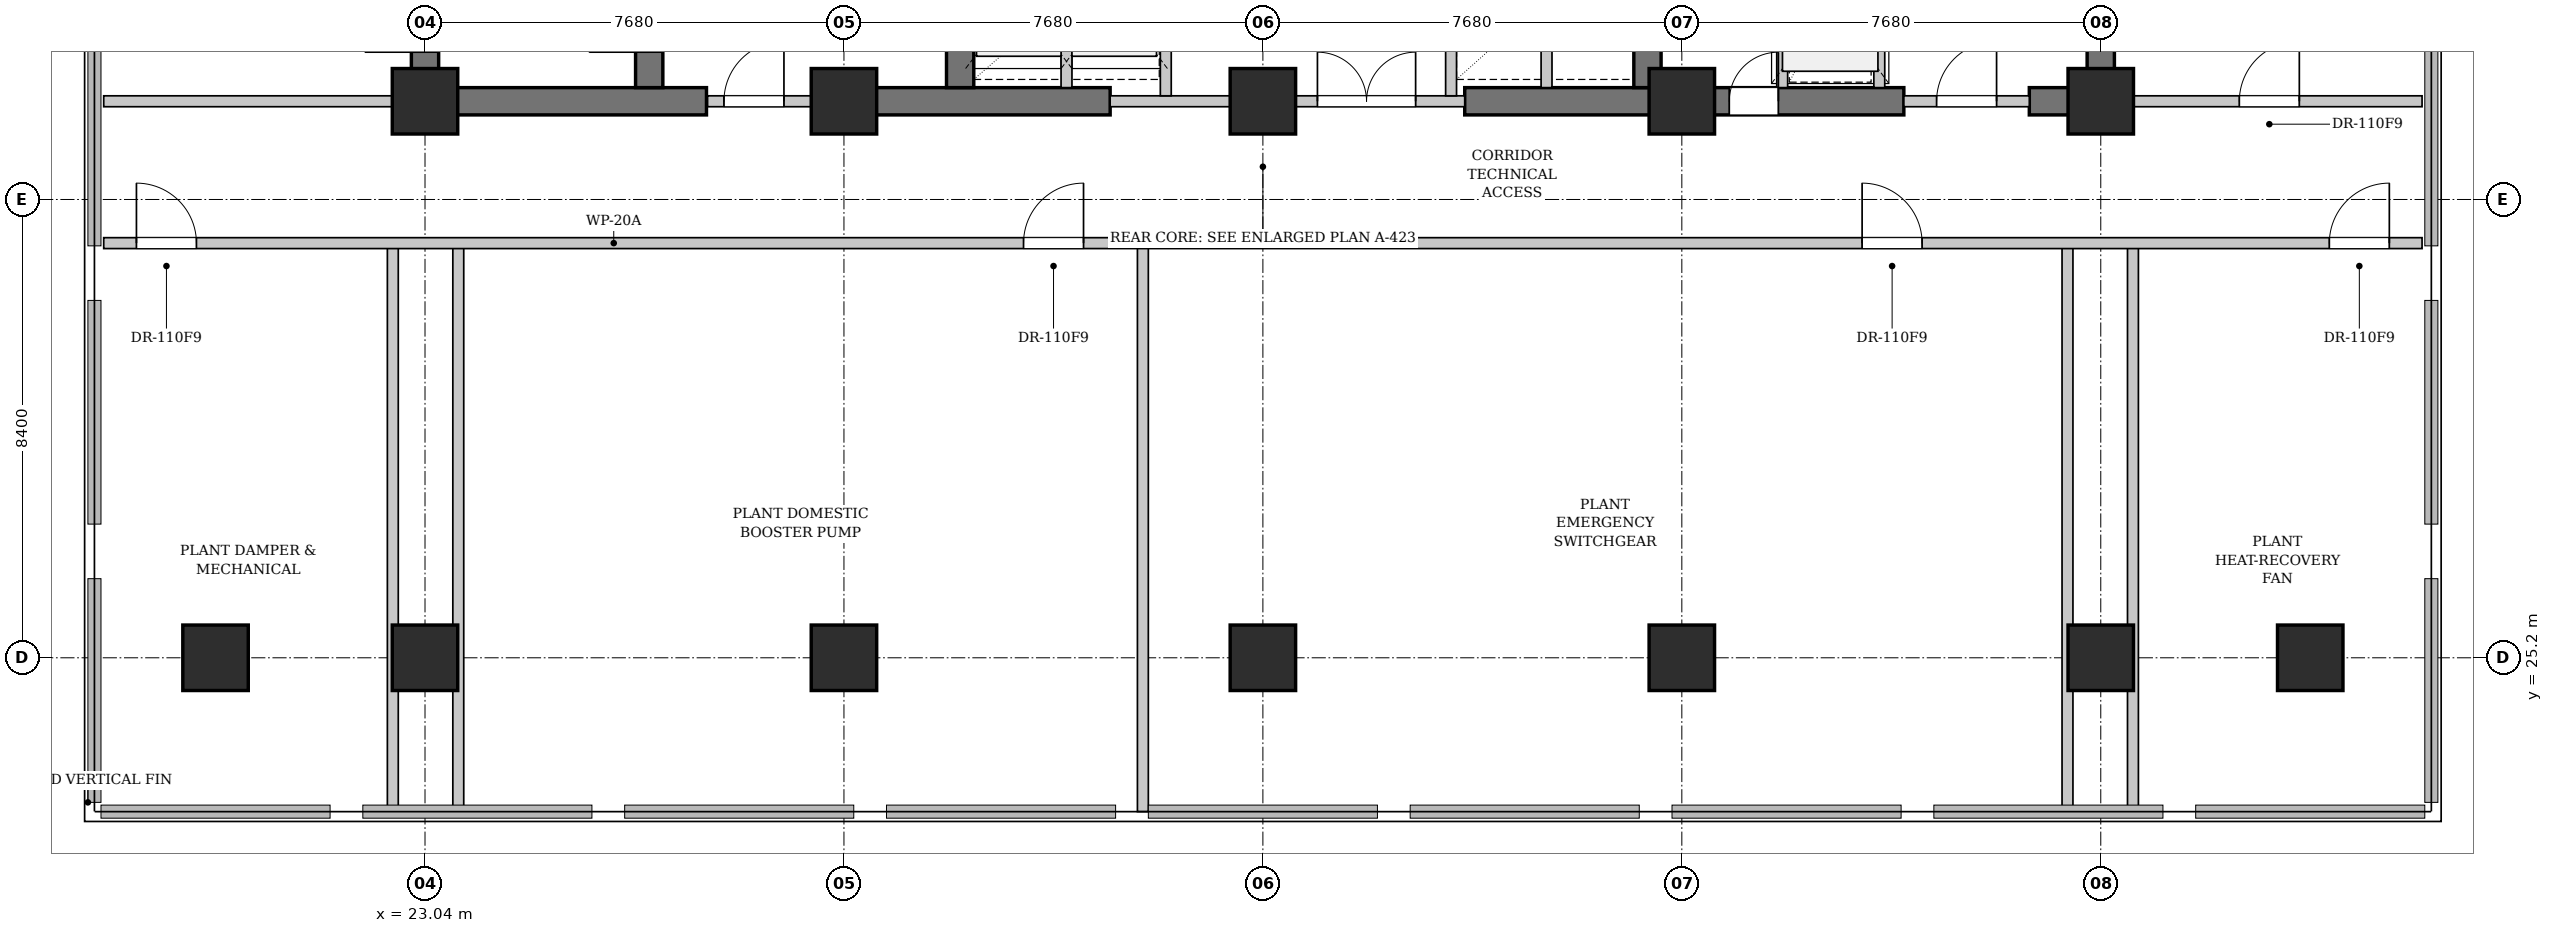
"""IFC4 building model, lengths in metres.
Left out: names, types, materials, properties, quantities, classifications, styles, units other than length and angle.
Written with IfcOpenShell. Run it as: python <this file> out.ifc"""

import sys

from ifc_helpers import new_model, si_unit, direction, frame, frame_2d, origin, origin_2d, place, context, subcontext, project, spatial, rectangle, extrude, element, fill, save


model = new_model("IFC4")
c1 = context("Model", 3, precision=1e-05, world=origin(), true_north=direction((0.0, 1.0)))
c2 = subcontext(c1, "Body", "Model", "MODEL_VIEW")
j1 = project(units=[si_unit("LENGTHUNIT", "METRE"), si_unit("PLANEANGLEUNIT", "RADIAN")], contexts=[c1])
p1 = place(None, origin())
s1 = spatial("IfcSite", under=j1, at=p1, CompositionType="ELEMENT")
p2 = place(p1, origin())
s2 = spatial("IfcBuilding", under=s1, at=p2, CompositionType="ELEMENT")
p3 = place(p2, frame((0.0, 0.0, 85.8)))
s3 = spatial("IfcBuildingStorey", under=s2, at=p3, CompositionType="ELEMENT", Elevation=85.8)
p4 = place(p3, frame((22.79, 35.4, 0.0), z_axis=(0.0, 0.0, 1.0), x_axis=(1.0, 0.0, 0.0)))
e1 = element("IfcWall", 1, at=p4, inside=s3, PredefinedType="SHEAR", context=c2, shape_type="SweptSolid", body=[
    extrude(rectangle(XDim=5.41, YDim=0.5, at=frame_2d((2.705, 0.0))), origin(), (0.0, 0.0, 1.0), 3.48),
])
p5 = place(p3, frame((30.72, 35.4, 0.0), z_axis=(0.0, 0.0, 1.0), x_axis=(1.0, 0.0, 0.0)))
e2 = element("IfcWall", 2, at=p5, inside=s3, PredefinedType="SHEAR", context=c2, shape_type="SweptSolid", body=[
    extrude(rectangle(XDim=4.88, YDim=0.5, at=frame_2d((2.44, 0.0))), origin(), (0.0, 0.0, 1.0), 3.48),
])
p6 = place(p3, frame((42.1, 35.4, 0.0), z_axis=(0.0, 0.0, 1.0), x_axis=(1.0, 0.0, 0.0)))
e3 = element("IfcWall", 3, at=p6, inside=s3, PredefinedType="SHEAR", context=c2, shape_type="SweptSolid", body=[
    extrude(rectangle(XDim=8.05, YDim=0.5, at=frame_2d((4.025, 0.0))), origin(), (0.0, 0.0, 1.0), 3.48),
])
p7 = place(p6, frame((4.85, 0.0, 0.0)))
e4 = element("IfcOpeningElement", 4, at=p7, cuts=e3, PredefinedType="OPENING", context=c2, shape_type="SweptSolid", body=[
    extrude(rectangle(XDim=0.9, YDim=2.15, at=frame_2d((0.45, 1.075))), frame((0.0, 0.26, 0.0), z_axis=(0.0, -1.0, 0.0), x_axis=(1.0, 0.0, 0.0)), (0.0, 0.0, 1.0), 0.52),
])
p8 = place(p3, frame((52.45, 35.4, 0.0), z_axis=(0.0, 0.0, 1.0), x_axis=(1.0, 0.0, 0.0)))
e5 = element("IfcWall", 5, at=p8, inside=s3, PredefinedType="SHEAR", context=c2, shape_type="SweptSolid", body=[
    extrude(rectangle(XDim=1.56, YDim=0.5, at=frame_2d((0.78, 0.0))), origin(), (0.0, 0.0, 1.0), 3.48),
])
p9 = place(p3, frame((23.04, 35.65, 0.0), z_axis=(0.0, 0.0, 1.0), x_axis=(0.0, 1.0, 0.0)))
e6 = element("IfcWall", 6, at=p9, inside=s3, PredefinedType="SHEAR", context=c2, shape_type="SweptSolid", body=[
    extrude(rectangle(XDim=10.3, YDim=0.5, at=frame_2d((5.15, 0.0))), origin(), (0.0, 0.0, 1.0), 3.48),
])
p10 = place(p9, frame((0.65, 0.0, 0.0)))
e7 = element("IfcOpeningElement", 7, at=p10, cuts=e6, PredefinedType="OPENING", context=c2, shape_type="SweptSolid", body=[
    extrude(rectangle(XDim=1.1, YDim=2.15, at=frame_2d((0.55, 1.075))), frame((0.0, 0.26, 0.0), z_axis=(0.0, -1.0, 0.0), x_axis=(1.0, 0.0, 0.0)), (0.0, 0.0, 1.0), 0.52),
])
p11 = place(p3, frame((27.15, 35.65, 0.0), z_axis=(0.0, 0.0, 1.0), x_axis=(0.0, 1.0, 0.0)))
e8 = element("IfcWall", 8, at=p11, inside=s3, PredefinedType="SHEAR", context=c2, shape_type="SweptSolid", body=[
    extrude(rectangle(XDim=10.3, YDim=0.5, at=frame_2d((5.15, 0.0))), origin(), (0.0, 0.0, 1.0), 3.48),
])
p12 = place(p11, frame((0.65, 0.0, 0.0)))
e9 = element("IfcOpeningElement", 9, at=p12, cuts=e8, PredefinedType="OPENING", context=c2, shape_type="SweptSolid", body=[
    extrude(rectangle(XDim=1.1, YDim=2.15, at=frame_2d((0.55, 1.075))), frame((0.0, 0.26, 0.0), z_axis=(0.0, -1.0, 0.0), x_axis=(1.0, 0.0, 0.0)), (0.0, 0.0, 1.0), 0.52),
])
for number, where, z_axis, x_axis in (
    (10, (32.85, 35.65, 0.0), (0.0, 0.0, 1.0), (0.0, 1.0, 0.0)),
    (11, (45.45, 35.65, 0.0), (0.0, 0.0, 1.0), (0.0, 1.0, 0.0)),
    (12, (53.76, 35.65, 0.0), (0.0, 0.0, 1.0), (0.0, 1.0, 0.0)),
):
    element("IfcWall", number, at=place(p3, frame(where, z_axis=z_axis, x_axis=x_axis)), inside=s3, PredefinedType="SHEAR", context=c2, shape_type="SweptSolid", body=[
        extrude(rectangle(XDim=10.3, YDim=0.5, at=frame_2d((5.15, 0.0))), origin(), (0.0, 0.0, 1.0), 3.48),
    ])
for number, where, z_axis, x_axis in (
    (13, (23.04, 35.4, 0.0), (0.0, 0.0, 1.0), (1.0, 0.0, 0.0)),
    (14, (23.04, 25.2, 0.0), (0.0, 0.0, 1.0), (1.0, 0.0, 0.0)),
    (15, (30.72, 35.4, 0.0), (0.0, 0.0, 1.0), (1.0, 0.0, 0.0)),
    (16, (30.72, 25.2, 0.0), (0.0, 0.0, 1.0), (1.0, 0.0, 0.0)),
    (17, (38.4, 35.4, 0.0), (0.0, 0.0, 1.0), (1.0, 0.0, 0.0)),
    (18, (38.4, 25.2, 0.0), (0.0, 0.0, 1.0), (1.0, 0.0, 0.0)),
    (19, (46.08, 35.4, 0.0), (0.0, 0.0, 1.0), (1.0, 0.0, 0.0)),
    (20, (46.08, 25.2, 0.0), (0.0, 0.0, 1.0), (1.0, 0.0, 0.0)),
    (21, (53.76, 35.4, 0.0), (0.0, 0.0, 1.0), (1.0, 0.0, 0.0)),
    (22, (53.76, 25.2, 0.0), (0.0, 0.0, 1.0), (1.0, 0.0, 0.0)),
    (23, (19.2, 25.2, 0.0), (0.0, 0.0, 1.0), (1.0, 0.0, 0.0)),
    (24, (57.6, 25.2, 0.0), (0.0, 0.0, 1.0), (1.0, 0.0, 0.0)),
):
    element("IfcColumn", number, at=place(p3, frame(where, z_axis=z_axis, x_axis=x_axis)), inside=s3, PredefinedType="COLUMN", context=c2, shape_type="SweptSolid", body=[
        extrude(rectangle(XDim=1.2, YDim=1.2, at=origin_2d()), origin(), (0.0, 0.0, 1.0), 3.9),
    ])
p13 = place(p3, frame((28.22, 35.4, 0.0), z_axis=(0.0, 0.0, 1.0), x_axis=(1.0, 0.0, 0.0)))
e25 = element("IfcWall", 25, at=p13, inside=s3, PredefinedType="PARTITIONING", context=c2, shape_type="SweptSolid", body=[
    extrude(rectangle(XDim=2.5, YDim=0.2, at=frame_2d((1.25, 0.0))), origin(), (0.0, 0.0, 1.0), 2.565),
])
p14 = place(p13, frame((0.3, 0.0, 0.0)))
e26 = element("IfcOpeningElement", 26, at=p14, cuts=e25, PredefinedType="OPENING", context=c2, shape_type="SweptSolid", body=[
    extrude(rectangle(XDim=1.1, YDim=2.15, at=frame_2d((0.55, 1.075))), frame((0.0, 0.11, 0.0), z_axis=(0.0, -1.0, 0.0), x_axis=(1.0, 0.0, 0.0)), (0.0, 0.0, 1.0), 0.22),
])
p15 = place(p3, frame((35.6, 35.4, 0.0), z_axis=(0.0, 0.0, 1.0), x_axis=(1.0, 0.0, 0.0)))
e27 = element("IfcWall", 27, at=p15, inside=s3, PredefinedType="PARTITIONING", context=c2, shape_type="SweptSolid", body=[
    extrude(rectangle(XDim=6.5, YDim=0.2, at=frame_2d((3.25, 0.0))), origin(), (0.0, 0.0, 1.0), 2.275),
])
p16 = place(p15, frame((3.8, 0.0, 0.0)))
e28 = element("IfcOpeningElement", 28, at=p16, cuts=e27, PredefinedType="OPENING", context=c2, shape_type="SweptSolid", body=[
    extrude(rectangle(XDim=1.8, YDim=2.3, at=frame_2d((0.9, 1.15))), frame((0.0, 0.11, 0.0), z_axis=(0.0, -1.0, 0.0), x_axis=(1.0, 0.0, 0.0)), (0.0, 0.0, 1.0), 0.22),
])
p17 = place(p3, frame((34.8, 35.65, 0.0), z_axis=(0.0, 0.0, 1.0), x_axis=(0.0, 1.0, 0.0)))
e29 = element("IfcWall", 29, at=p17, inside=s3, PredefinedType="PARTITIONING", context=c2, shape_type="SweptSolid", body=[
    extrude(rectangle(XDim=3.25, YDim=0.2, at=frame_2d((1.625, 0.0))), origin(), (0.0, 0.0, 1.0), 3.48),
])
p18 = place(p3, frame((36.62, 35.5, 0.0), z_axis=(0.0, 0.0, 1.0), x_axis=(0.0, 1.0, 0.0)))
e30 = element("IfcWall", 30, at=p18, inside=s3, PredefinedType="PARTITIONING", context=c2, shape_type="SweptSolid", body=[
    extrude(rectangle(XDim=3.4, YDim=0.2, at=frame_2d((1.7, 0.0))), origin(), (0.0, 0.0, 1.0), 3.48),
])
p19 = place(p3, frame((43.6, 35.65, 0.0), z_axis=(0.0, 0.0, 1.0), x_axis=(0.0, 1.0, 0.0)))
e31 = element("IfcWall", 31, at=p19, inside=s3, PredefinedType="PARTITIONING", context=c2, shape_type="SweptSolid", body=[
    extrude(rectangle(XDim=3.25, YDim=0.2, at=frame_2d((1.625, 0.0))), origin(), (0.0, 0.0, 1.0), 3.48),
])
p20 = place(p3, frame((41.85, 35.5, 0.0), z_axis=(0.0, 0.0, 1.0), x_axis=(0.0, 1.0, 0.0)))
e32 = element("IfcWall", 32, at=p20, inside=s3, PredefinedType="PARTITIONING", context=c2, shape_type="SweptSolid", body=[
    extrude(rectangle(XDim=3.4, YDim=0.2, at=frame_2d((1.7, 0.0))), origin(), (0.0, 0.0, 1.0), 3.48),
])
p21 = place(p3, frame((50.15, 35.4, 0.0), z_axis=(0.0, 0.0, 1.0), x_axis=(1.0, 0.0, 0.0)))
e33 = element("IfcWall", 33, at=p21, inside=s3, PredefinedType="PARTITIONING", context=c2, shape_type="SweptSolid", body=[
    extrude(rectangle(XDim=2.3, YDim=0.2, at=frame_2d((1.15, 0.0))), origin(), (0.0, 0.0, 1.0), 2.565),
])
p22 = place(p21, frame((0.6, 0.0, 0.0)))
e34 = element("IfcOpeningElement", 34, at=p22, cuts=e33, PredefinedType="OPENING", context=c2, shape_type="SweptSolid", body=[
    extrude(rectangle(XDim=1.1, YDim=2.15, at=frame_2d((0.55, 1.075))), frame((0.0, 0.11, 0.0), z_axis=(0.0, -1.0, 0.0), x_axis=(1.0, 0.0, 0.0)), (0.0, 0.0, 1.0), 0.22),
])
p23 = place(p3, frame((49.7, 35.65, 0.0), z_axis=(0.0, 0.0, 1.0), x_axis=(0.0, 1.0, 0.0)))
e35 = element("IfcWall", 35, at=p23, inside=s3, PredefinedType="PARTITIONING", context=c2, shape_type="SweptSolid", body=[
    extrude(rectangle(XDim=3.15, YDim=0.2, at=frame_2d((1.575, 0.0))), origin(), (0.0, 0.0, 1.0), 3.48),
])
p24 = place(p23, frame((0.85, 0.0, 0.0)))
e36 = element("IfcOpeningElement", 36, at=p24, cuts=e35, PredefinedType="OPENING", context=c2, shape_type="SweptSolid", body=[
    extrude(rectangle(XDim=1.2, YDim=2.2, at=frame_2d((0.6, 1.1))), frame((0.0, 0.11, 0.0), z_axis=(0.0, -1.0, 0.0), x_axis=(1.0, 0.0, 0.0)), (0.0, 0.0, 1.0), 0.22),
])
p25 = place(p3, frame((47.92, 35.65, 0.0), z_axis=(0.0, 0.0, 1.0), x_axis=(0.0, 1.0, 0.0)))
e37 = element("IfcWall", 37, at=p25, inside=s3, PredefinedType="PARTITIONING", context=c2, shape_type="SweptSolid", body=[
    extrude(rectangle(XDim=3.15, YDim=0.2, at=frame_2d((1.575, 0.0))), origin(), (0.0, 0.0, 1.0), 3.48),
])
p26 = place(p3, frame((17.15, 35.4, 0.0), z_axis=(0.0, 0.0, 1.0), x_axis=(1.0, 0.0, 0.0)))
e38 = element("IfcWall", 38, at=p26, inside=s3, PredefinedType="PARTITIONING", context=c2, shape_type="SweptSolid", body=[
    extrude(rectangle(XDim=5.6, YDim=0.2, at=frame_2d((2.8, 0.0))), origin(), (0.0, 0.0, 1.0), 3.48),
])
p27 = place(p3, frame((54.05, 35.4, 0.0), z_axis=(0.0, 0.0, 1.0), x_axis=(1.0, 0.0, 0.0)))
e39 = element("IfcWall", 39, at=p27, inside=s3, PredefinedType="PARTITIONING", context=c2, shape_type="SweptSolid", body=[
    extrude(rectangle(XDim=5.6, YDim=0.2, at=frame_2d((2.8, 0.0))), origin(), (0.0, 0.0, 1.0), 3.48),
])
p28 = place(p27, frame((2.25, 0.0, 0.0)))
e40 = element("IfcOpeningElement", 40, at=p28, cuts=e39, PredefinedType="OPENING", context=c2, shape_type="SweptSolid", body=[
    extrude(rectangle(XDim=1.1, YDim=2.15, at=frame_2d((0.55, 1.075))), frame((0.0, 0.11, 0.0), z_axis=(0.0, -1.0, 0.0), x_axis=(1.0, 0.0, 0.0)), (0.0, 0.0, 1.0), 0.22),
])
p29 = place(p3, frame((22.45, 22.38, 0.0), z_axis=(0.0, 0.0, 1.0), x_axis=(0.0, 1.0, 0.0)))
e41 = element("IfcWall", 41, at=p29, inside=s3, PredefinedType="PARTITIONING", context=c2, shape_type="SweptSolid", body=[
    extrude(rectangle(XDim=10.42, YDim=0.2, at=frame_2d((5.21, 0.0))), origin(), (0.0, 0.0, 1.0), 2.275),
])
for number, where, z_axis, x_axis in (
    (42, (23.65, 22.38, 0.0), (0.0, 0.0, 1.0), (0.0, 1.0, 0.0)),
    (43, (36.2, 22.38, 0.0), (0.0, 0.0, 1.0), (0.0, 1.0, 0.0)),
    (44, (53.15, 22.38, 0.0), (0.0, 0.0, 1.0), (0.0, 1.0, 0.0)),
):
    element("IfcWall", number, at=place(p3, frame(where, z_axis=z_axis, x_axis=x_axis)), inside=s3, PredefinedType="PARTITIONING", context=c2, shape_type="SweptSolid", body=[
        extrude(rectangle(XDim=10.42, YDim=0.2, at=frame_2d((5.21, 0.0))), origin(), (0.0, 0.0, 1.0), 3.48),
    ])
p30 = place(p3, frame((54.35, 22.38, 0.0), z_axis=(0.0, 0.0, 1.0), x_axis=(0.0, 1.0, 0.0)))
e45 = element("IfcWall", 45, at=p30, inside=s3, PredefinedType="PARTITIONING", context=c2, shape_type="SweptSolid", body=[
    extrude(rectangle(XDim=10.42, YDim=0.2, at=frame_2d((5.21, 0.0))), origin(), (0.0, 0.0, 1.0), 2.275),
])
p31 = place(p3, frame((17.15, 32.8, 0.0), z_axis=(0.0, 0.0, 1.0), x_axis=(1.0, 0.0, 0.0)))
e46 = element("IfcWall", 46, at=p31, inside=s3, PredefinedType="PARTITIONING", context=c2, shape_type="SweptSolid", body=[
    extrude(rectangle(XDim=42.5, YDim=0.2, at=frame_2d((21.25, 0.0))), origin(), (0.0, 0.0, 1.0), 2.275),
])
p32 = place(p31, frame((0.6, 0.0, 0.0)))
e47 = element("IfcOpeningElement", 47, at=p32, cuts=e46, PredefinedType="OPENING", context=c2, shape_type="SweptSolid", body=[
    extrude(rectangle(XDim=1.1, YDim=2.15, at=frame_2d((0.55, 1.075))), frame((0.0, 0.11, 0.0), z_axis=(0.0, -1.0, 0.0), x_axis=(1.0, 0.0, 0.0)), (0.0, 0.0, 1.0), 0.22),
])
p33 = place(p31, frame((16.862, 0.0, 0.0)))
e48 = element("IfcOpeningElement", 48, at=p33, cuts=e46, PredefinedType="OPENING", context=c2, shape_type="SweptSolid", body=[
    extrude(rectangle(XDim=1.1, YDim=2.15, at=frame_2d((0.55, 1.075))), frame((0.0, 0.11, 0.0), z_axis=(0.0, -1.0, 0.0), x_axis=(1.0, 0.0, 0.0)), (0.0, 0.0, 1.0), 0.22),
])
p34 = place(p31, frame((32.235, 0.0, 0.0)))
e49 = element("IfcOpeningElement", 49, at=p34, cuts=e46, PredefinedType="OPENING", context=c2, shape_type="SweptSolid", body=[
    extrude(rectangle(XDim=1.1, YDim=2.15, at=frame_2d((0.55, 1.075))), frame((0.0, 0.11, 0.0), z_axis=(0.0, -1.0, 0.0), x_axis=(1.0, 0.0, 0.0)), (0.0, 0.0, 1.0), 0.22),
])
p35 = place(p31, frame((40.8, 0.0, 0.0)))
e50 = element("IfcOpeningElement", 50, at=p35, cuts=e46, PredefinedType="OPENING", context=c2, shape_type="SweptSolid", body=[
    extrude(rectangle(XDim=1.1, YDim=2.15, at=frame_2d((0.55, 1.075))), frame((0.0, 0.11, 0.0), z_axis=(0.0, -1.0, 0.0), x_axis=(1.0, 0.0, 0.0)), (0.0, 0.0, 1.0), 0.22),
])
p36 = place(p14, origin())
e51 = element("IfcDoor", 51, at=p36, inside=s3, OperationType="SINGLE_SWING_RIGHT", PredefinedType="DOOR", context=c2, shape_type="SweptSolid", body=[
    extrude(rectangle(XDim=1.1, YDim=2.15, at=frame_2d((0.55, 1.075))), frame((0.0, 0.025, 0.0), z_axis=(0.0, -1.0, 0.0), x_axis=(1.0, 0.0, 0.0)), (0.0, 0.0, 1.0), 0.05),
])
fill(e26, e51)
p37 = place(p16, origin())
e52 = element("IfcDoor", 52, at=p37, inside=s3, OperationType="DOUBLE_DOOR_SINGLE_SWING", PredefinedType="DOOR", context=c2, shape_type="SweptSolid", body=[
    extrude(rectangle(XDim=1.8, YDim=2.3, at=frame_2d((0.9, 1.15))), frame((0.0, 0.025, 0.0), z_axis=(0.0, -1.0, 0.0), x_axis=(1.0, 0.0, 0.0)), (0.0, 0.0, 1.0), 0.05),
])
fill(e28, e52)
p38 = place(p22, origin())
e53 = element("IfcDoor", 53, at=p38, inside=s3, OperationType="SINGLE_SWING_RIGHT", PredefinedType="DOOR", context=c2, shape_type="SweptSolid", body=[
    extrude(rectangle(XDim=1.1, YDim=2.15, at=frame_2d((0.55, 1.075))), frame((0.0, 0.025, 0.0), z_axis=(0.0, -1.0, 0.0), x_axis=(1.0, 0.0, 0.0)), (0.0, 0.0, 1.0), 0.05),
])
fill(e34, e53)
p39 = place(p28, origin())
e54 = element("IfcDoor", 54, at=p39, inside=s3, OperationType="SINGLE_SWING_RIGHT", PredefinedType="DOOR", context=c2, shape_type="SweptSolid", body=[
    extrude(rectangle(XDim=1.1, YDim=2.15, at=frame_2d((0.55, 1.075))), frame((0.0, 0.025, 0.0), z_axis=(0.0, -1.0, 0.0), x_axis=(1.0, 0.0, 0.0)), (0.0, 0.0, 1.0), 0.05),
])
fill(e40, e54)
p40 = place(p32, origin())
e55 = element("IfcDoor", 55, at=p40, inside=s3, OperationType="SINGLE_SWING_LEFT", PredefinedType="DOOR", context=c2, shape_type="SweptSolid", body=[
    extrude(rectangle(XDim=1.1, YDim=2.15, at=frame_2d((0.55, 1.075))), frame((0.0, 0.025, 0.0), z_axis=(0.0, -1.0, 0.0), x_axis=(1.0, 0.0, 0.0)), (0.0, 0.0, 1.0), 0.05),
])
fill(e47, e55)
p41 = place(p33, origin())
e56 = element("IfcDoor", 56, at=p41, inside=s3, OperationType="SINGLE_SWING_RIGHT", PredefinedType="DOOR", context=c2, shape_type="SweptSolid", body=[
    extrude(rectangle(XDim=1.1, YDim=2.15, at=frame_2d((0.55, 1.075))), frame((0.0, 0.025, 0.0), z_axis=(0.0, -1.0, 0.0), x_axis=(1.0, 0.0, 0.0)), (0.0, 0.0, 1.0), 0.05),
])
fill(e48, e56)
p42 = place(p34, origin())
e57 = element("IfcDoor", 57, at=p42, inside=s3, OperationType="SINGLE_SWING_LEFT", PredefinedType="DOOR", context=c2, shape_type="SweptSolid", body=[
    extrude(rectangle(XDim=1.1, YDim=2.15, at=frame_2d((0.55, 1.075))), frame((0.0, 0.025, 0.0), z_axis=(0.0, -1.0, 0.0), x_axis=(1.0, 0.0, 0.0)), (0.0, 0.0, 1.0), 0.05),
])
fill(e49, e57)
p43 = place(p35, origin())
e58 = element("IfcDoor", 58, at=p43, inside=s3, OperationType="SINGLE_SWING_RIGHT", PredefinedType="DOOR", context=c2, shape_type="SweptSolid", body=[
    extrude(rectangle(XDim=1.1, YDim=2.15, at=frame_2d((0.55, 1.075))), frame((0.0, 0.025, 0.0), z_axis=(0.0, -1.0, 0.0), x_axis=(1.0, 0.0, 0.0)), (0.0, 0.0, 1.0), 0.05),
])
fill(e50, e58)
p44 = place(p7, origin())
e59 = element("IfcDoor", 59, at=p44, inside=s3, OperationType="SINGLE_SWING_RIGHT", PredefinedType="DOOR", context=c2, shape_type="SweptSolid", body=[
    extrude(rectangle(XDim=0.9, YDim=2.15, at=frame_2d((0.45, 1.075))), frame((0.0, 0.025, 0.0), z_axis=(0.0, -1.0, 0.0), x_axis=(1.0, 0.0, 0.0)), (0.0, 0.0, 1.0), 0.05),
])
fill(e4, e59)
save(model, sys.argv[1])
